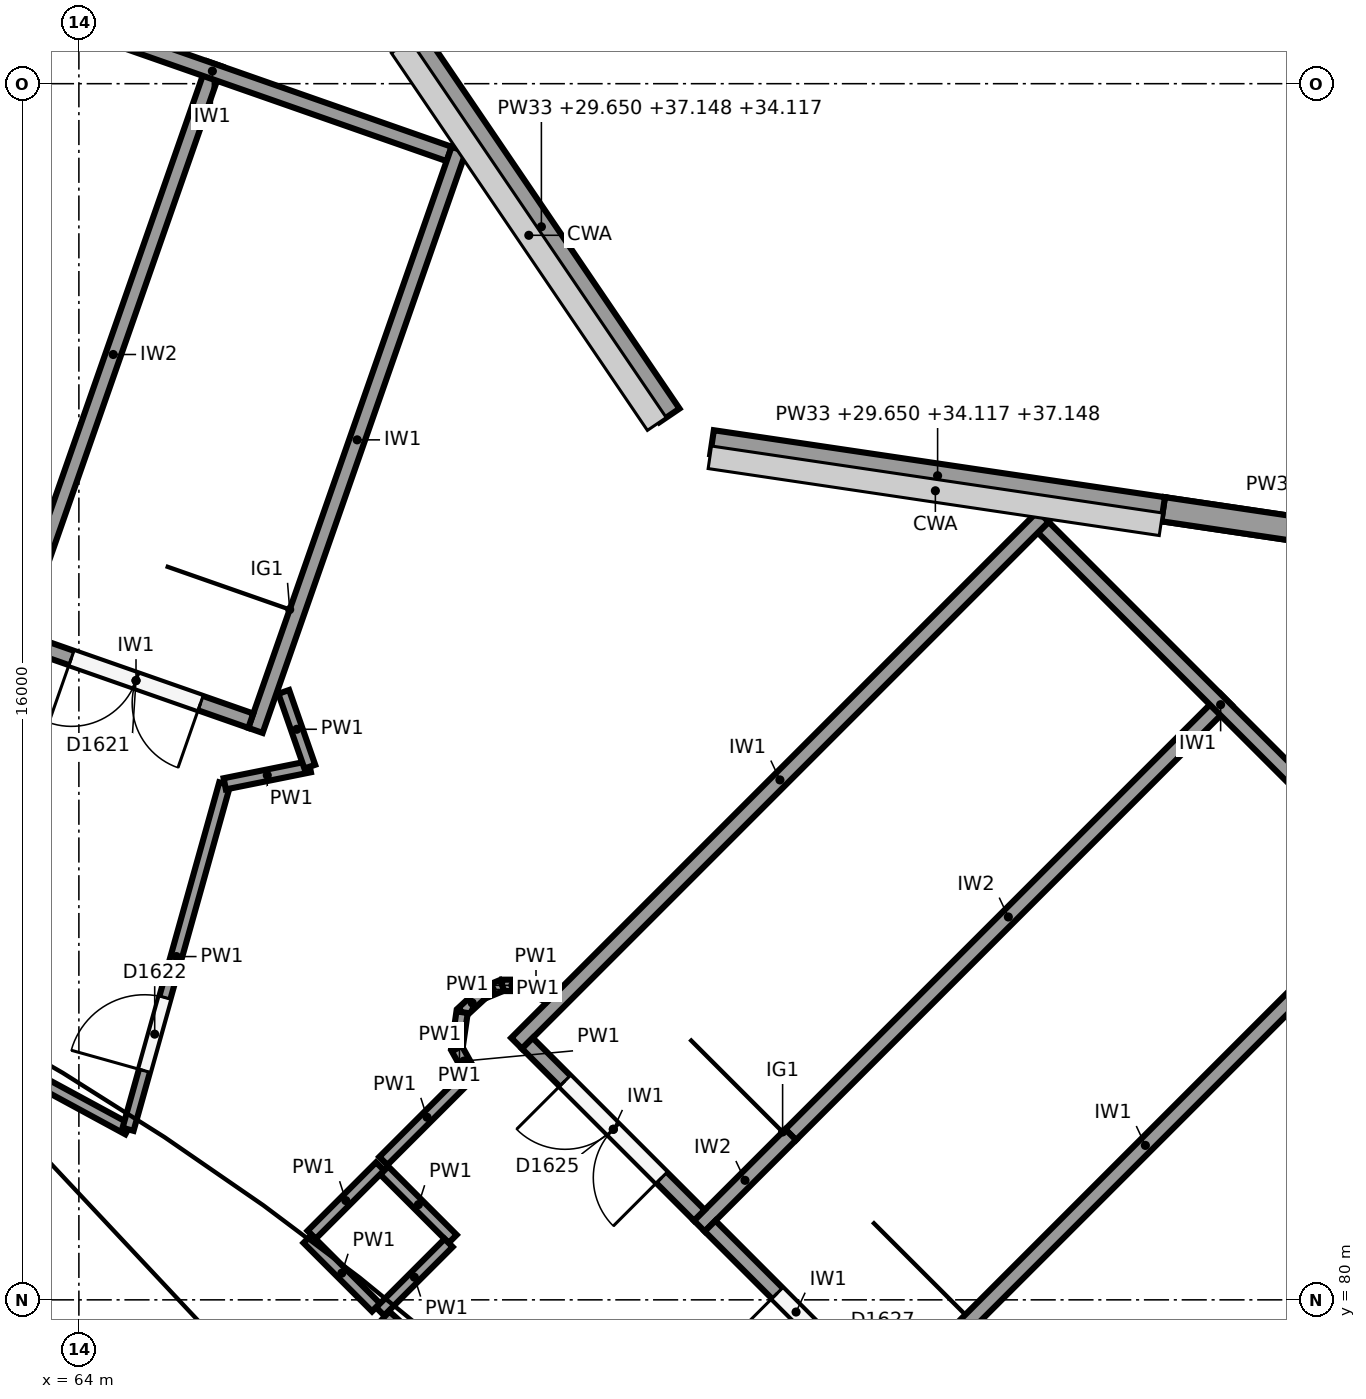
"""IFC4 building model, lengths in metres.
Left out: names, types, materials, properties, quantities, classifications, styles, units other than length and angle.
Written with IfcOpenShell. Run it as: python <this file> out.ifc"""

import sys

from ifc_helpers import new_model, si_unit, direction, frame, frame_2d, origin, origin_2d, place, context, subcontext, project, spatial, polyline, rectangle, circle, outline, extrude, element, fill, save


model = new_model("IFC4")
c1 = context("Model", 3, precision=1e-05, world=origin(), true_north=direction((0.0, 1.0)))
c2 = subcontext(c1, "Body", "Model", "MODEL_VIEW")
j1 = project(units=[si_unit("LENGTHUNIT", "METRE"), si_unit("PLANEANGLEUNIT", "RADIAN")], contexts=[c1])
p1 = place(None, origin())
s1 = spatial("IfcSite", under=j1, at=p1, CompositionType="ELEMENT")
p2 = place(p1, origin())
s2 = spatial("IfcBuilding", under=s1, at=p2, CompositionType="ELEMENT")
p3 = place(p2, frame((0.0, 0.0, 24.0)))
s3 = spatial("IfcBuildingStorey", under=s2, at=p3, CompositionType="ELEMENT", Elevation=24.0)
p4 = place(p3, frame((71.775, 79.889, 0.0), z_axis=(0.0, 0.0, 1.0), x_axis=(1.0, 0.0, 0.0)))
e1 = element("IfcColumn", 1, at=p4, inside=s3, PredefinedType="COLUMN", context=c2, shape_type="SweptSolid", body=[
    extrude(circle(Radius=0.6, at=origin_2d()), origin(), (0.0, 0.0, 1.0), 6.0),
])
p5 = place(p3, frame((64.622, 84.792, 0.0), z_axis=(0.0, 0.0, 1.0), x_axis=(1.0, 0.0, 0.0)))
e2 = element("IfcColumn", 2, at=p5, inside=s3, PredefinedType="COLUMN", context=c2, shape_type="SweptSolid", body=[
    extrude(circle(Radius=0.5, at=origin_2d()), origin(), (0.0, 0.0, 1.0), 5.3),
])
p6 = place(p3, frame((71.857, 91.151, 0.0), z_axis=(0.0, 0.0, 1.0), x_axis=(1.0, 0.0, 0.0)))
e3 = element("IfcColumn", 3, at=p6, inside=s3, PredefinedType="COLUMN", context=c2, shape_type="SweptSolid", body=[
    extrude(circle(Radius=0.45, at=origin_2d()), origin(), (0.0, 0.0, 1.0), 6.0),
])
p7 = place(p3, frame((78.266, 90.402, 0.0), z_axis=(0.0, 0.0, 1.0), x_axis=(0.989154104726, -0.146881438937, 0.0)))
e4 = element("IfcWall", 4, at=p7, inside=s3, PredefinedType="SOLIDWALL", context=c2, shape_type="SweptSolid", body=[
    extrude(rectangle(XDim=6.514, YDim=0.32, at=frame_2d((3.257, 0.0))), origin(), (0.0, 0.0, 1.0), 6.0),
])
p8 = place(p7, frame((5.25, 0.0, 1.0)))
e5 = element("IfcOpeningElement", 5, at=p8, cuts=e4, PredefinedType="OPENING", context=c2, shape_type="SweptSolid", body=[
    extrude(rectangle(XDim=0.9, YDim=3.25, at=frame_2d((0.45, 1.625))), frame((0.0, 0.17, 0.0), z_axis=(0.0, -1.0, 0.0), x_axis=(1.0, 0.0, 0.0)), (0.0, 0.0, 1.0), 0.34),
])
p9 = place(p3, frame((78.266, 90.402, 6.0), z_axis=(0.0, 0.0, 1.0), x_axis=(0.989154104726, -0.146881438937, 0.0)))
e6 = element("IfcWall", 6, at=p9, inside=s3, PredefinedType="SOLIDWALL", context=c2, shape_type="SweptSolid", body=[
    extrude(outline(polyline([(0.0, 0.0), (6.514, 0.0), (6.514, 10.438), (0.0, 7.147), (0.0, 0.0)])), frame((0.0, 0.16, 0.0), z_axis=(0.0, -1.0, 0.0), x_axis=(1.0, 0.0, 0.0)), (0.0, 0.0, 1.0), 0.32),
])
p10 = place(p9, frame((5.25, 0.0, 1.6)))
e7 = element("IfcOpeningElement", 7, at=p10, cuts=e6, PredefinedType="OPENING", context=c2, shape_type="SweptSolid", body=[
    extrude(rectangle(XDim=0.9, YDim=3.0, at=frame_2d((0.45, 1.5))), frame((0.0, 0.17, 0.0), z_axis=(0.0, -1.0, 0.0), x_axis=(1.0, 0.0, 0.0)), (0.0, 0.0, 1.0), 0.34),
])
p11 = place(p3, frame((72.331, 91.283, 5.65), z_axis=(0.0, 0.0, 1.0), x_axis=(0.989158190862, -0.146853918747, 0.0)))
e8 = element("IfcWall", 8, at=p11, inside=s3, PredefinedType="SOLIDWALL", context=c2, shape_type="SweptSolid", body=[
    extrude(outline(polyline([(0.0, 0.0), (6.0, 0.0), (6.0, 7.498), (0.0, 4.467), (0.0, 0.0)])), frame((0.0, 0.16, 0.0), z_axis=(0.0, -1.0, 0.0), x_axis=(1.0, 0.0, 0.0)), (0.0, 0.0, 1.0), 0.32),
])
p12 = place(p3, frame((68.401, 96.6, 5.65), z_axis=(0.0, 0.0, 1.0), x_axis=(0.561498433341, -0.827477799917, 0.0)))
e9 = element("IfcWall", 9, at=p12, inside=s3, PredefinedType="SOLIDWALL", context=c2, shape_type="SweptSolid", body=[
    extrude(outline(polyline([(0.0, 0.0), (6.0, 0.0), (6.0, 4.467), (0.0, 7.498), (0.0, 0.0)])), frame((0.0, 0.16, 0.0), z_axis=(0.0, -1.0, 0.0), x_axis=(1.0, 0.0, 0.0)), (0.0, 0.0, 1.0), 0.32),
])
for number, where, z_axis, x_axis in (
    (10, (86.305, 80.688, 0.0), (0.0, 0.0, 1.0), (-0.707, -0.707, 0.0)),
    (11, (81.497, 85.497, 0.0), (0.0, 0.0, 1.0), (-0.707, -0.707, 0.0)),
    (12, (76.688, 90.305, 0.0), (0.0, 0.0, 1.0), (-0.707, -0.707, 0.0)),
):
    element("IfcWall", number, at=place(p3, frame(where, z_axis=z_axis, x_axis=x_axis)), inside=s3, PredefinedType="SHEAR", context=c2, shape_type="SweptSolid", body=[
        extrude(rectangle(XDim=9.8, YDim=0.2, at=frame_2d((4.9, 0.0))), origin(), (0.0, 0.0, 1.0), 5.75),
    ])
p13 = place(p3, frame((81.355, 85.497, 0.0), z_axis=(0.0, 0.0, 1.0), x_axis=(-0.707088285305, 0.707125276584, 0.0)))
e13 = element("IfcWall", 13, at=p13, inside=s3, PredefinedType="SHEAR", context=c2, shape_type="SweptSolid", body=[
    extrude(rectangle(XDim=6.6, YDim=0.2, at=frame_2d((3.3, 0.0))), origin(), (0.0, 0.0, 1.0), 5.75),
])
for number, where, z_axis, x_axis in (
    (14, (83.901, 83.093, 0.0), (0.0, 0.0, 1.0), (-0.707, -0.707, 0.0)),
    (15, (79.093, 87.901, 0.0), (0.0, 0.0, 1.0), (-0.707, -0.707, 0.0)),
):
    element("IfcWall", number, at=place(p3, frame(where, z_axis=z_axis, x_axis=x_axis)), inside=s3, PredefinedType="SHEAR", context=c2, shape_type="SweptSolid", body=[
        extrude(rectangle(XDim=8.1, YDim=0.2, at=frame_2d((4.05, 0.0))), origin(), (0.0, 0.0, 1.0), 5.75),
    ])
p14 = place(p3, frame((73.365, 82.173, 0.0), z_axis=(0.0, 0.0, 1.0), x_axis=(-0.707034968179, -0.707178586901, 0.0)))
e16 = element("IfcWall", 16, at=p14, inside=s3, PredefinedType="SHEAR", context=c2, shape_type="SweptSolid", body=[
    extrude(rectangle(XDim=1.7, YDim=0.2, at=frame_2d((0.85, 0.0))), origin(), (0.0, 0.0, 1.0), 5.75),
])
p15 = place(p3, frame((74.567, 78.708, 0.0), z_axis=(0.0, 0.0, 1.0), x_axis=(-0.707106781187, 0.707106781187, 0.0)))
e17 = element("IfcWall", 17, at=p15, inside=s3, PredefinedType="SHEAR", context=c2, shape_type="SweptSolid", body=[
    extrude(rectangle(XDim=3.2, YDim=0.2, at=frame_2d((1.6, 0.0))), origin(), (0.0, 0.0, 1.0), 5.75),
])
p16 = place(p15, frame((0.15, 0.0, 0.0)))
e18 = element("IfcOpeningElement", 18, at=p16, cuts=e17, PredefinedType="OPENING", context=c2, shape_type="SweptSolid", body=[
    extrude(rectangle(XDim=1.8, YDim=2.1, at=frame_2d((0.9, 1.05))), frame((0.0, 0.11, 0.0), z_axis=(0.0, -1.0, 0.0), x_axis=(1.0, 0.0, 0.0)), (0.0, 0.0, 1.0), 0.22),
])
p17 = place(p3, frame((72.163, 81.113, 0.0), z_axis=(0.0, 0.0, 1.0), x_axis=(-0.707144925854, 0.707068634461, 0.0)))
e19 = element("IfcWall", 19, at=p17, inside=s3, PredefinedType="SHEAR", context=c2, shape_type="SweptSolid", body=[
    extrude(rectangle(XDim=3.2, YDim=0.2, at=frame_2d((1.6, 0.0))), origin(), (0.0, 0.0, 1.0), 5.75),
])
p18 = place(p17, frame((0.7, 0.0, 0.0)))
e20 = element("IfcOpeningElement", 20, at=p18, cuts=e19, PredefinedType="OPENING", context=c2, shape_type="SweptSolid", body=[
    extrude(rectangle(XDim=1.8, YDim=2.1, at=frame_2d((0.9, 1.05))), frame((0.0, 0.11, 0.0), z_axis=(0.0, -1.0, 0.0), x_axis=(1.0, 0.0, 0.0)), (0.0, 0.0, 1.0), 0.22),
])
p19 = place(p3, frame((68.998, 95.137, 0.0), z_axis=(0.0, 0.0, 1.0), x_axis=(-0.330263153216, -0.943888896866, 0.0)))
e21 = element("IfcWall", 21, at=p19, inside=s3, PredefinedType="SHEAR", context=c2, shape_type="SweptSolid", body=[
    extrude(rectangle(XDim=8.1, YDim=0.2, at=frame_2d((4.05, 0.0))), origin(), (0.0, 0.0, 1.0), 5.75),
])
p20 = place(p3, frame((68.871, 95.076, 0.0), z_axis=(0.0, 0.0, 1.0), x_axis=(-0.943880844925, 0.330286164688, 0.0)))
e22 = element("IfcWall", 22, at=p20, inside=s3, PredefinedType="SHEAR", context=c2, shape_type="SweptSolid", body=[
    extrude(rectangle(XDim=6.6, YDim=0.2, at=frame_2d((3.3, 0.0))), origin(), (0.0, 0.0, 1.0), 5.75),
])
p21 = place(p3, frame((65.789, 96.26, 0.0), z_axis=(0.0, 0.0, 1.0), x_axis=(-0.330280610426, -0.943882788474, 0.0)))
e23 = element("IfcWall", 23, at=p21, inside=s3, PredefinedType="SHEAR", context=c2, shape_type="SweptSolid", body=[
    extrude(rectangle(XDim=8.1, YDim=0.2, at=frame_2d((4.05, 0.0))), origin(), (0.0, 0.0, 1.0), 5.75),
])
p22 = place(p3, frame((66.262, 87.619, 0.0), z_axis=(0.0, 0.0, 1.0), x_axis=(-0.943878576031, 0.330292648585, 0.0)))
e24 = element("IfcWall", 24, at=p22, inside=s3, PredefinedType="SHEAR", context=c2, shape_type="SweptSolid", body=[
    extrude(rectangle(XDim=3.2, YDim=0.2, at=frame_2d((1.6, 0.0))), origin(), (0.0, 0.0, 1.0), 5.75),
])
p23 = place(p22, frame((0.7, 0.0, 0.0)))
e25 = element("IfcOpeningElement", 25, at=p23, cuts=e24, PredefinedType="OPENING", context=c2, shape_type="SweptSolid", body=[
    extrude(rectangle(XDim=1.8, YDim=2.1, at=frame_2d((0.9, 1.05))), frame((0.0, 0.11, 0.0), z_axis=(0.0, -1.0, 0.0), x_axis=(1.0, 0.0, 0.0)), (0.0, 0.0, 1.0), 0.22),
])
for number, where, z_axis, x_axis in (
    (26, (68.918, 80.802, 0.0), (0.0, 0.0, 1.0), (-0.707, 0.707, 0.0)),
    (27, (67.963, 81.757, 0.0), (0.0, 0.0, 1.0), (-0.707, -0.707, 0.0)),
    (28, (67.009, 80.802, 0.0), (0.0, 0.0, 1.0), (0.707, -0.707, 0.0)),
):
    element("IfcWall", number, at=place(p3, frame(where, z_axis=z_axis, x_axis=x_axis)), inside=s3, PredefinedType="PARTITIONING", context=c2, shape_type="SweptSolid", body=[
        extrude(rectangle(XDim=1.275, YDim=0.15, at=frame_2d((0.638, 0.0))), origin(), (0.0, 0.0, 1.0), 5.4),
    ])
p24 = place(p3, frame((67.963, 79.847, 0.0), z_axis=(0.0, 0.0, 1.0), x_axis=(0.707202523759, 0.707011025648, 0.0)))
e29 = element("IfcWall", 29, at=p24, inside=s3, PredefinedType="PARTITIONING", context=c2, shape_type="SweptSolid", body=[
    extrude(rectangle(XDim=1.275, YDim=0.15, at=frame_2d((0.637, 0.0))), origin(), (0.0, 0.0, 1.0), 5.4),
])
p25 = place(p3, frame((70.176, 83.989, 0.0), z_axis=(0.0, 0.0, 1.0), x_axis=(-0.908360268621, 0.418188501026, 0.0)))
e30 = element("IfcWall", 30, at=p25, inside=s3, PredefinedType="PARTITIONING", context=c2, shape_type="SweptSolid", body=[
    extrude(rectangle(XDim=0.356, YDim=0.15, at=frame_2d((0.178, 0.0))), origin(), (0.0, 0.0, 1.0), 5.4),
])
p26 = place(p3, frame((69.853, 84.137, 0.0), z_axis=(0.0, 0.0, 1.0), x_axis=(-1.0, 0.0, 0.0)))
e31 = element("IfcWall", 31, at=p26, inside=s3, PredefinedType="PARTITIONING", context=c2, shape_type="SweptSolid", body=[
    extrude(rectangle(XDim=0.285, YDim=0.15, at=frame_2d((0.143, 0.0))), origin(), (0.0, 0.0, 1.0), 5.4),
])
p27 = place(p3, frame((69.568, 84.137, 0.0), z_axis=(0.0, 0.0, 1.0), x_axis=(-0.923869084389, -0.382708655389, 0.0)))
e32 = element("IfcWall", 32, at=p27, inside=s3, PredefinedType="PARTITIONING", context=c2, shape_type="SweptSolid", body=[
    extrude(rectangle(XDim=0.282, YDim=0.15, at=frame_2d((0.141, 0.0))), origin(), (0.0, 0.0, 1.0), 5.4),
])
p28 = place(p3, frame((69.307, 84.03, 0.0), z_axis=(0.0, 0.0, 1.0), x_axis=(-0.733947821225, -0.679205856658, 0.0)))
e33 = element("IfcWall", 33, at=p28, inside=s3, PredefinedType="PARTITIONING", context=c2, shape_type="SweptSolid", body=[
    extrude(rectangle(XDim=0.361, YDim=0.15, at=frame_2d((0.181, 0.0))), origin(), (0.0, 0.0, 1.0), 5.4),
])
p29 = place(p3, frame((69.042, 83.784, 0.0), z_axis=(0.0, 0.0, 1.0), x_axis=(-0.14318574461, -0.989695833345, 0.0)))
e34 = element("IfcWall", 34, at=p29, inside=s3, PredefinedType="PARTITIONING", context=c2, shape_type="SweptSolid", body=[
    extrude(rectangle(XDim=0.484, YDim=0.15, at=frame_2d((0.242, 0.0))), origin(), (0.0, 0.0, 1.0), 5.4),
])
p30 = place(p3, frame((68.973, 83.305, 0.0), z_axis=(0.0, 0.0, 1.0), x_axis=(0.487354621502, -0.873204141596, 0.0)))
e35 = element("IfcWall", 35, at=p30, inside=s3, PredefinedType="PARTITIONING", context=c2, shape_type="SweptSolid", body=[
    extrude(rectangle(XDim=0.375, YDim=0.15, at=frame_2d((0.188, 0.0))), origin(), (0.0, 0.0, 1.0), 5.4),
])
p31 = place(p3, frame((69.156, 82.977, 0.0), z_axis=(0.0, 0.0, 1.0), x_axis=(-0.707106781187, -0.707106781187, 0.0)))
e36 = element("IfcWall", 36, at=p31, inside=s3, PredefinedType="PARTITIONING", context=c2, shape_type="SweptSolid", body=[
    extrude(rectangle(XDim=1.625, YDim=0.15, at=frame_2d((0.813, 0.0))), origin(), (0.0, 0.0, 1.0), 5.4),
])
p32 = place(p3, frame((68.034, 79.792, 0.0), z_axis=(0.0, 0.0, 1.0), x_axis=(0.742586219179, -0.669750481213, 0.0)))
e37 = element("IfcWall", 37, at=p32, inside=s3, PredefinedType="PARTITIONING", context=c2, shape_type="SweptSolid", body=[
    extrude(rectangle(XDim=2.454, YDim=0.15, at=frame_2d((1.227, 0.0))), origin(), (0.0, 0.0, 1.0), 5.4),
])
p33 = place(p3, frame((59.421, 85.075, 0.0), z_axis=(0.0, 0.0, 1.0), x_axis=(0.879221718344, -0.476412814681, 0.0)))
e38 = element("IfcWall", 38, at=p33, inside=s3, PredefinedType="PARTITIONING", context=c2, shape_type="SweptSolid", body=[
    extrude(rectangle(XDim=5.944, YDim=0.15, at=frame_2d((2.972, 0.0))), origin(), (0.0, 0.0, 1.0), 5.4),
])
p34 = place(p3, frame((64.647, 82.244, 0.0), z_axis=(0.0, 0.0, 1.0), x_axis=(0.269497535686, 0.963001079054, 0.0)))
e39 = element("IfcWall", 39, at=p34, inside=s3, PredefinedType="PARTITIONING", context=c2, shape_type="SweptSolid", body=[
    extrude(rectangle(XDim=4.72, YDim=0.15, at=frame_2d((2.36, 0.0))), origin(), (0.0, 0.0, 1.0), 5.4),
])
p35 = place(p34, frame((0.8, 0.0, 0.0)))
e40 = element("IfcOpeningElement", 40, at=p35, cuts=e39, PredefinedType="OPENING", context=c2, shape_type="SweptSolid", body=[
    extrude(rectangle(XDim=1.0, YDim=2.1, at=frame_2d((0.5, 1.05))), frame((0.0, 0.085, 0.0), z_axis=(0.0, -1.0, 0.0), x_axis=(1.0, 0.0, 0.0)), (0.0, 0.0, 1.0), 0.17),
])
p36 = place(p3, frame((65.919, 86.789, 0.0), z_axis=(0.0, 0.0, 1.0), x_axis=(0.980275107334, 0.197637835299, 0.0)))
e41 = element("IfcWall", 41, at=p36, inside=s3, PredefinedType="PARTITIONING", context=c2, shape_type="SweptSolid", body=[
    extrude(rectangle(XDim=1.141, YDim=0.15, at=frame_2d((0.571, 0.0))), origin(), (0.0, 0.0, 1.0), 5.4),
])
p37 = place(p3, frame((67.038, 87.014, 0.0), z_axis=(0.0, 0.0, 1.0), x_axis=(-0.328920401707, 0.944357649061, 0.0)))
e42 = element("IfcWall", 42, at=p37, inside=s3, PredefinedType="PARTITIONING", context=c2, shape_type="SweptSolid", body=[
    extrude(rectangle(XDim=1.042, YDim=0.15, at=frame_2d((0.521, 0.0))), origin(), (0.0, 0.0, 1.0), 5.4),
])
p38 = place(p16, origin())
e43 = element("IfcDoor", 43, at=p38, inside=s3, OperationType="DOUBLE_DOOR_SINGLE_SWING", PredefinedType="DOOR", context=c2, shape_type="SweptSolid", body=[
    extrude(rectangle(XDim=1.8, YDim=2.1, at=frame_2d((0.9, 1.05))), frame((0.0, 0.025, 0.0), z_axis=(0.0, -1.0, 0.0), x_axis=(1.0, 0.0, 0.0)), (0.0, 0.0, 1.0), 0.05),
])
fill(e18, e43)
p39 = place(p18, origin())
e44 = element("IfcDoor", 44, at=p39, inside=s3, OperationType="DOUBLE_DOOR_SINGLE_SWING", PredefinedType="DOOR", context=c2, shape_type="SweptSolid", body=[
    extrude(rectangle(XDim=1.8, YDim=2.1, at=frame_2d((0.9, 1.05))), frame((0.0, 0.025, 0.0), z_axis=(0.0, -1.0, 0.0), x_axis=(1.0, 0.0, 0.0)), (0.0, 0.0, 1.0), 0.05),
])
fill(e20, e44)
p40 = place(p23, origin())
e45 = element("IfcDoor", 45, at=p40, inside=s3, OperationType="DOUBLE_DOOR_SINGLE_SWING", PredefinedType="DOOR", context=c2, shape_type="SweptSolid", body=[
    extrude(rectangle(XDim=1.8, YDim=2.1, at=frame_2d((0.9, 1.05))), frame((0.0, 0.025, 0.0), z_axis=(0.0, -1.0, 0.0), x_axis=(1.0, 0.0, 0.0)), (0.0, 0.0, 1.0), 0.05),
])
fill(e25, e45)
p41 = place(p35, origin())
e46 = element("IfcDoor", 46, at=p41, inside=s3, OperationType="SINGLE_SWING_LEFT", PredefinedType="DOOR", context=c2, shape_type="SweptSolid", body=[
    extrude(rectangle(XDim=1.0, YDim=2.1, at=frame_2d((0.5, 1.05))), frame((0.0, 0.025, 0.0), z_axis=(0.0, -1.0, 0.0), x_axis=(1.0, 0.0, 0.0)), (0.0, 0.0, 1.0), 0.05),
])
fill(e40, e46)
save(model, sys.argv[1])
